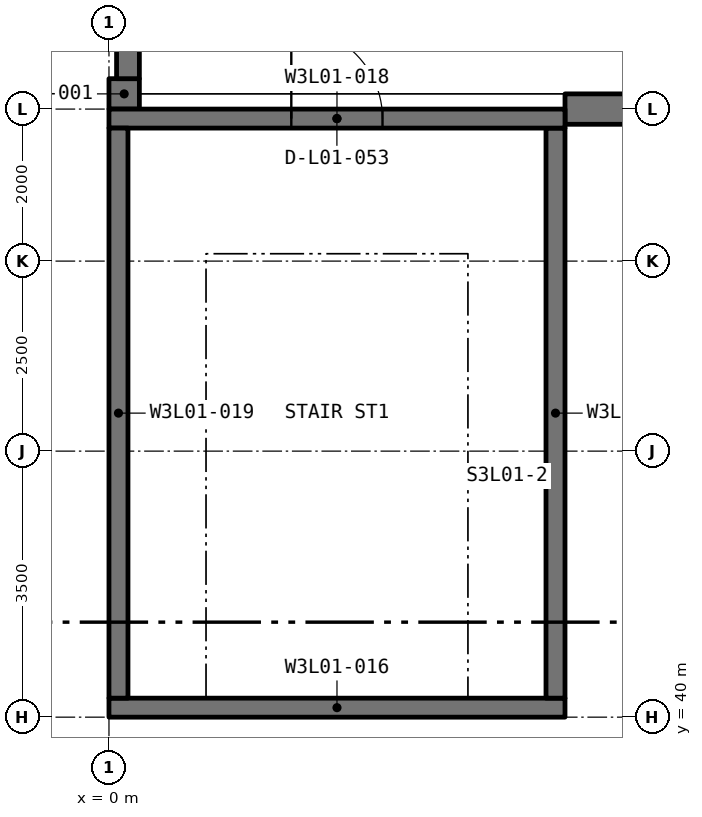
"""IFC4 building model, lengths in metres.
Left out: names, types, materials, properties, quantities, classifications, styles, units other than length and angle.
Written with IfcOpenShell. Run it as: python <this file> out.ifc"""

import sys

from ifc_helpers import new_model, si_unit, direction, frame, frame_2d, origin, place, context, subcontext, project, spatial, rectangle, extrude, element, fill, save


model = new_model("IFC4")
c1 = context("Model", 3, precision=1e-05, world=origin(), true_north=direction((0.0, 1.0)))
c2 = subcontext(c1, "Body", "Model", "MODEL_VIEW")
j1 = project(units=[si_unit("LENGTHUNIT", "METRE"), si_unit("PLANEANGLEUNIT", "RADIAN")], contexts=[c1])
p1 = place(None, origin())
s1 = spatial("IfcSite", under=j1, at=p1, CompositionType="ELEMENT")
p2 = place(p1, origin())
s2 = spatial("IfcBuilding", under=s1, at=p2, CompositionType="ELEMENT")
p3 = place(p2, frame((0.0, 0.0, 6.0)))
s3 = spatial("IfcBuildingStorey", under=s2, at=p3, CompositionType="ELEMENT", Elevation=6.0)
p4 = place(p3, frame((0.2, 48.0, -0.3), z_axis=(0.0, 0.0, 1.0), x_axis=(0.0, 1.0, 0.0)))
e1 = element("IfcWall", 1, at=p4, inside=s3, PredefinedType="SOLIDWALL", context=c2, shape_type="SweptSolid", body=[
    extrude(rectangle(XDim=0.4, YDim=0.4, at=frame_2d((0.2, 0.0))), origin(), (0.0, 0.0, 1.0), 5.25),
])
p5 = place(p3, frame((0.25, 48.4, -0.3), z_axis=(0.0, 0.0, 1.0), x_axis=(0.0, 1.0, 0.0)))
e2 = element("IfcWall", 2, at=p5, inside=s3, PredefinedType="SOLIDWALL", context=c2, shape_type="SweptSolid", body=[
    extrude(rectangle(XDim=7.2, YDim=0.3, at=frame_2d((3.6, 0.0))), origin(), (0.0, 0.0, 1.0), 5.25),
])
p6 = place(p3, frame((6.0, 48.0, -0.3), z_axis=(0.0, 0.0, 1.0), x_axis=(1.0, 0.0, 0.0)))
e3 = element("IfcWall", 3, at=p6, inside=s3, PredefinedType="SOLIDWALL", context=c2, shape_type="SweptSolid", body=[
    extrude(rectangle(XDim=17.4, YDim=0.4, at=frame_2d((8.7, 0.0))), origin(), (0.0, 0.0, 1.0), 5.25),
])
p7 = place(p3, frame((0.0, 40.125, -0.3), z_axis=(0.0, 0.0, 1.0), x_axis=(1.0, 0.0, 0.0)))
e4 = element("IfcWall", 4, at=p7, inside=s3, PredefinedType="SHEAR", context=c2, shape_type="SweptSolid", body=[
    extrude(rectangle(XDim=6.0, YDim=0.25, at=frame_2d((3.0, 0.0))), origin(), (0.0, 0.0, 1.0), 3.05),
])
p8 = place(p3, frame((5.875, 40.25, -0.3), z_axis=(0.0, 0.0, 1.0), x_axis=(0.0, 1.0, 0.0)))
e5 = element("IfcWall", 5, at=p8, inside=s3, PredefinedType="SHEAR", context=c2, shape_type="SweptSolid", body=[
    extrude(rectangle(XDim=7.5, YDim=0.25, at=frame_2d((3.75, 0.0))), origin(), (0.0, 0.0, 1.0), 3.05),
])
p9 = place(p3, frame((0.0, 47.875, -0.3), z_axis=(0.0, 0.0, 1.0), x_axis=(1.0, 0.0, 0.0)))
e6 = element("IfcWall", 6, at=p9, inside=s3, PredefinedType="SHEAR", context=c2, shape_type="SweptSolid", body=[
    extrude(rectangle(XDim=6.0, YDim=0.25, at=frame_2d((3.0, 0.0))), origin(), (0.0, 0.0, 1.0), 3.05),
])
p10 = place(p9, frame((2.399, 0.0, 0.3)))
e7 = element("IfcOpeningElement", 7, at=p10, cuts=e6, PredefinedType="OPENING", context=c2, shape_type="SweptSolid", body=[
    extrude(rectangle(XDim=1.2, YDim=2.2, at=frame_2d((0.6, 1.1))), frame((0.0, 0.135, 0.0), z_axis=(0.0, -1.0, 0.0), x_axis=(1.0, 0.0, 0.0)), (0.0, 0.0, 1.0), 0.27),
])
p11 = place(p3, frame((0.125, 40.25, -0.3), z_axis=(0.0, 0.0, 1.0), x_axis=(0.0, 1.0, 0.0)))
e8 = element("IfcWall", 8, at=p11, inside=s3, PredefinedType="SHEAR", context=c2, shape_type="SweptSolid", body=[
    extrude(rectangle(XDim=7.5, YDim=0.25, at=frame_2d((3.75, 0.0))), origin(), (0.0, 0.0, 1.0), 3.05),
])
p12 = place(p10, origin())
e9 = element("IfcDoor", 9, at=p12, inside=s3, OperationType="SINGLE_SWING_LEFT", PredefinedType="DOOR", context=c2, shape_type="SweptSolid", body=[
    extrude(rectangle(XDim=1.2, YDim=2.2, at=frame_2d((0.6, 1.1))), frame((0.0, 0.025, 0.0), z_axis=(0.0, -1.0, 0.0), x_axis=(1.0, 0.0, 0.0)), (0.0, 0.0, 1.0), 0.05),
])
fill(e7, e9)
save(model, sys.argv[1])
